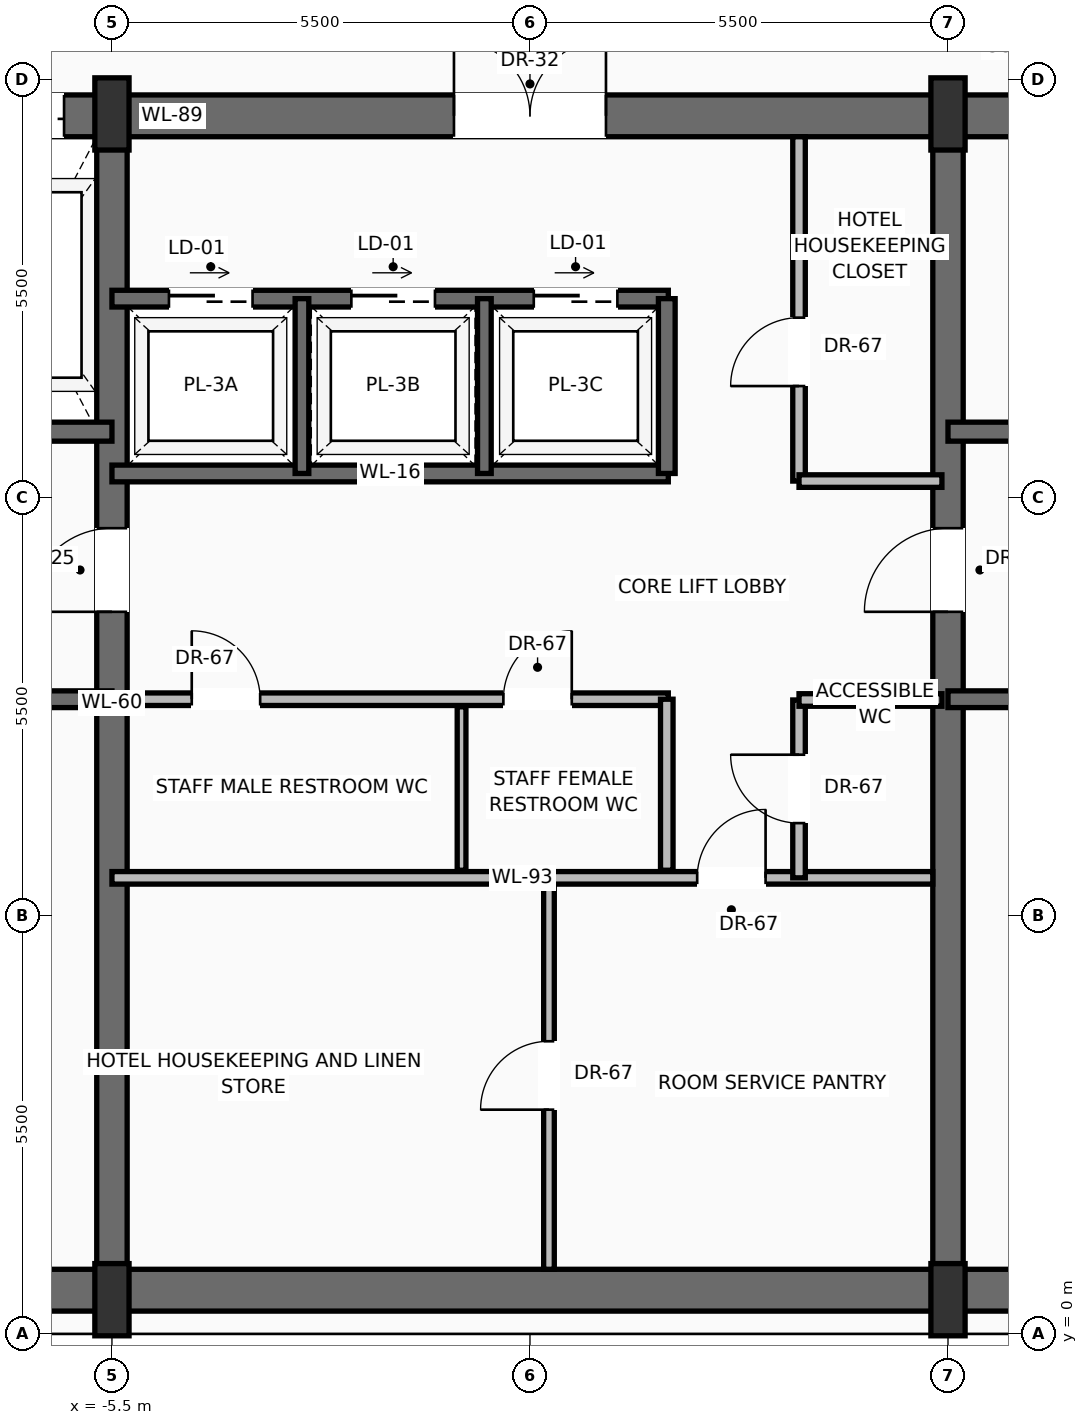
"""IFC4 building model, lengths in metres.
Left out: names, types, materials, properties, quantities, classifications, styles, units other than length and angle.
Written with IfcOpenShell. Run it as: python <this file> out.ifc"""

import sys

from ifc_helpers import new_model, si_unit, direction, frame, frame_2d, origin, origin_2d, place, context, subcontext, project, spatial, rectangle, extrude, source, transform, mapped, element, fill, save


model = new_model("IFC4")
c1 = context("Model", 3, precision=1e-05, world=origin(), true_north=direction((0.0, 1.0)))
c2 = subcontext(c1, "Body", "Model", "MODEL_VIEW")
j1 = project(units=[si_unit("LENGTHUNIT", "METRE"), si_unit("PLANEANGLEUNIT", "RADIAN")], contexts=[c1])
p1 = place(None, origin())
s1 = spatial("IfcSite", under=j1, at=p1, CompositionType="ELEMENT")
p2 = place(p1, origin())
s2 = spatial("IfcBuilding", under=s1, at=p2, CompositionType="ELEMENT")
p3 = place(p2, frame((0.0, 0.0, 230.35)))
s3 = spatial("IfcBuildingStorey", under=s2, at=p3, CompositionType="ELEMENT", Elevation=230.35)
p4 = place(p3, frame((-10.65, 0.575, 0.0), z_axis=(0.0, 0.0, 1.0), x_axis=(1.0, 0.0, 0.0)))
e1 = element("IfcWall", 1, at=p4, inside=s3, PredefinedType="SHEAR", context=c2, shape_type="SweptSolid", body=[
    extrude(rectangle(XDim=21.3, YDim=0.55, at=frame_2d((10.65, 0.0))), origin(), (0.0, 0.0, 1.0), 3.24),
])
p5 = place(p3, frame((-10.7, 16.025, 0.0), z_axis=(0.0, 0.0, 1.0), x_axis=(1.0, 0.0, 0.0)))
e2 = element("IfcWall", 2, at=p5, inside=s3, PredefinedType="SHEAR", context=c2, shape_type="SweptSolid", body=[
    extrude(rectangle(XDim=21.4, YDim=0.55, at=frame_2d((10.7, 0.0))), origin(), (0.0, 0.0, 1.0), 3.24),
])
p6 = place(p5, frame((3.27, 0.0, 0.0)))
e3 = element("IfcOpeningElement", 3, at=p6, cuts=e2, PredefinedType="OPENING", context=c2, shape_type="SweptSolid", body=[
    extrude(rectangle(XDim=1.3, YDim=2.3, at=frame_2d((0.65, 1.15))), frame((0.0, 0.285, 0.0), z_axis=(0.0, -1.0, 0.0), x_axis=(1.0, 0.0, 0.0)), (0.0, 0.0, 1.0), 0.57),
])
p7 = place(p5, frame((9.7, 0.0, 0.0)))
e4 = element("IfcOpeningElement", 4, at=p7, cuts=e2, PredefinedType="OPENING", context=c2, shape_type="SweptSolid", body=[
    extrude(rectangle(XDim=2.0, YDim=2.4, at=frame_2d((1.0, 1.2))), frame((0.0, 0.285, 0.0), z_axis=(0.0, -1.0, 0.0), x_axis=(1.0, 0.0, 0.0)), (0.0, 0.0, 1.0), 0.57),
])
p8 = place(p3, frame((-5.5, 0.575, 0.0), z_axis=(0.0, 0.0, 1.0), x_axis=(0.0, 1.0, 0.0)))
e5 = element("IfcWall", 5, at=p8, inside=s3, PredefinedType="SHEAR", context=c2, shape_type="SweptSolid", body=[
    extrude(rectangle(XDim=15.45, YDim=0.4, at=frame_2d((7.725, 0.0))), origin(), (0.0, 0.0, 1.0), 3.24),
])
p9 = place(p8, frame((8.925, 0.0, 0.0)))
e6 = element("IfcOpeningElement", 6, at=p9, cuts=e5, PredefinedType="OPENING", context=c2, shape_type="SweptSolid", body=[
    extrude(rectangle(XDim=1.1, YDim=2.2, at=frame_2d((0.55, 1.1))), frame((0.0, 0.21, 0.0), z_axis=(0.0, -1.0, 0.0), x_axis=(1.0, 0.0, 0.0)), (0.0, 0.0, 1.0), 0.42),
])
p10 = place(p3, frame((5.5, 0.575, 0.0), z_axis=(0.0, 0.0, 1.0), x_axis=(0.0, 1.0, 0.0)))
e7 = element("IfcWall", 7, at=p10, inside=s3, PredefinedType="SHEAR", context=c2, shape_type="SweptSolid", body=[
    extrude(rectangle(XDim=15.45, YDim=0.4, at=frame_2d((7.725, 0.0))), origin(), (0.0, 0.0, 1.0), 3.24),
])
p11 = place(p10, frame((8.925, 0.0, 0.0)))
e8 = element("IfcOpeningElement", 8, at=p11, cuts=e7, PredefinedType="OPENING", context=c2, shape_type="SweptSolid", body=[
    extrude(rectangle(XDim=1.1, YDim=2.2, at=frame_2d((0.55, 1.1))), frame((0.0, 0.21, 0.0), z_axis=(0.0, -1.0, 0.0), x_axis=(1.0, 0.0, 0.0)), (0.0, 0.0, 1.0), 0.42),
])
m1 = source(origin(), c2, "Body", "SweptSolid", [
    extrude(rectangle(XDim=0.45, YDim=0.95, at=origin_2d()), origin(), (0.0, 0.0, 1.0), 3.45),
])
for number, where, z_axis, x_axis in (
    (9, (-5.5, 0.45, 0.0), (0.0, 0.0, 1.0), (1.0, 0.0, 0.0)),
    (10, (5.5, 0.45, 0.0), (0.0, 0.0, 1.0), (1.0, 0.0, 0.0)),
    (11, (-5.5, 16.05, 0.0), (0.0, 0.0, 1.0), (1.0, 0.0, 0.0)),
    (12, (5.5, 16.05, 0.0), (0.0, 0.0, 1.0), (1.0, 0.0, 0.0)),
):
    element("IfcColumn", number, at=place(p3, frame(where, z_axis=z_axis, x_axis=x_axis)), inside=s3, PredefinedType="PILASTER", context=c2, shape_type="MappedRepresentation", body=[
        mapped(m1, transform((0.0, 0.0, 0.0), scale=1.0)),
    ])
p12 = place(p3, frame((-5.5, 8.35, 0.0), z_axis=(0.0, 0.0, 1.0), x_axis=(-1.0, 0.0, 0.0)))
e13 = element("IfcWall", 13, at=p12, inside=s3, PredefinedType="SOLIDWALL", context=c2, shape_type="SweptSolid", body=[
    extrude(rectangle(XDim=4.65, YDim=0.22, at=frame_2d((2.325, 0.0))), origin(), (0.0, 0.0, 1.0), 3.24),
])
p13 = place(p12, frame((2.5, 0.0, 0.0)))
e14 = element("IfcOpeningElement", 14, at=p13, cuts=e13, PredefinedType="OPENING", context=c2, shape_type="SweptSolid", body=[
    extrude(rectangle(XDim=1.15, YDim=2.2, at=frame_2d((0.575, 1.1))), frame((0.0, 0.12, 0.0), z_axis=(0.0, -1.0, 0.0), x_axis=(1.0, 0.0, 0.0)), (0.0, 0.0, 1.0), 0.24),
])
p14 = place(p3, frame((-5.5, 11.87, 0.0), z_axis=(0.0, 0.0, 1.0), x_axis=(-1.0, 0.0, 0.0)))
e15 = element("IfcWall", 15, at=p14, inside=s3, PredefinedType="SOLIDWALL", context=c2, shape_type="SweptSolid", body=[
    extrude(rectangle(XDim=4.65, YDim=0.25, at=frame_2d((2.325, 0.0))), origin(), (0.0, 0.0, 1.0), 3.24),
])
p15 = place(p14, frame((2.95, 0.0, 0.0)))
e16 = element("IfcOpeningElement", 16, at=p15, cuts=e15, PredefinedType="OPENING", context=c2, shape_type="SweptSolid", body=[
    extrude(rectangle(XDim=1.2, YDim=2.25, at=frame_2d((0.6, 1.125))), frame((0.0, 0.135, 0.0), z_axis=(0.0, -1.0, 0.0), x_axis=(1.0, 0.0, 0.0)), (0.0, 0.0, 1.0), 0.27),
])
p16 = place(p3, frame((10.15, 8.35, 0.0), z_axis=(0.0, 0.0, 1.0), x_axis=(-1.0, 0.0, 0.0)))
e17 = element("IfcWall", 17, at=p16, inside=s3, PredefinedType="SOLIDWALL", context=c2, shape_type="SweptSolid", body=[
    extrude(rectangle(XDim=4.65, YDim=0.22, at=frame_2d((2.325, 0.0))), origin(), (0.0, 0.0, 1.0), 3.24),
])
p17 = place(p16, frame((1.0, 0.0, 0.0)))
e18 = element("IfcOpeningElement", 18, at=p17, cuts=e17, PredefinedType="OPENING", context=c2, shape_type="SweptSolid", body=[
    extrude(rectangle(XDim=1.15, YDim=2.2, at=frame_2d((0.575, 1.1))), frame((0.0, 0.12, 0.0), z_axis=(0.0, -1.0, 0.0), x_axis=(1.0, 0.0, 0.0)), (0.0, 0.0, 1.0), 0.24),
])
p18 = place(p3, frame((10.15, 11.87, 0.0), z_axis=(0.0, 0.0, 1.0), x_axis=(-1.0, 0.0, 0.0)))
e19 = element("IfcWall", 19, at=p18, inside=s3, PredefinedType="SOLIDWALL", context=c2, shape_type="SweptSolid", body=[
    extrude(rectangle(XDim=4.65, YDim=0.25, at=frame_2d((2.325, 0.0))), origin(), (0.0, 0.0, 1.0), 3.24),
])
p19 = place(p18, frame((0.5, 0.0, 0.0)))
e20 = element("IfcOpeningElement", 20, at=p19, cuts=e19, PredefinedType="OPENING", context=c2, shape_type="SweptSolid", body=[
    extrude(rectangle(XDim=1.2, YDim=2.25, at=frame_2d((0.6, 1.125))), frame((0.0, 0.135, 0.0), z_axis=(0.0, -1.0, 0.0), x_axis=(1.0, 0.0, 0.0)), (0.0, 0.0, 1.0), 0.27),
])
p20 = place(p3, frame((-5.5, 6.0, 0.0), z_axis=(0.0, 0.0, 1.0), x_axis=(1.0, 0.0, 0.0)))
e21 = element("IfcWall", 21, at=p20, inside=s3, PredefinedType="PARTITIONING", context=c2, shape_type="SweptSolid", body=[
    extrude(rectangle(XDim=10.8, YDim=0.165, at=frame_2d((5.4, 0.0))), origin(), (0.0, 0.0, 1.0), 3.232),
])
p21 = place(p20, frame((7.7, 0.0, 0.0)))
e22 = element("IfcOpeningElement", 22, at=p21, cuts=e21, PredefinedType="OPENING", context=c2, shape_type="SweptSolid", body=[
    extrude(rectangle(XDim=0.9, YDim=2.1, at=frame_2d((0.45, 1.05))), frame((0.0, 0.093, 0.0), z_axis=(0.0, -1.0, 0.0), x_axis=(1.0, 0.0, 0.0)), (0.0, 0.0, 1.0), 0.185),
])
p22 = place(p3, frame((0.25, 0.85, 0.0), z_axis=(0.0, 0.0, 1.0), x_axis=(0.0, 1.0, 0.0)))
e23 = element("IfcWall", 23, at=p22, inside=s3, PredefinedType="PARTITIONING", context=c2, shape_type="SweptSolid", body=[
    extrude(rectangle(XDim=5.03, YDim=0.14, at=frame_2d((2.515, 0.0))), origin(), (0.0, 0.0, 1.0), 3.232),
])
p23 = place(p22, frame((2.1, 0.0, 0.0)))
e24 = element("IfcOpeningElement", 24, at=p23, cuts=e23, PredefinedType="OPENING", context=c2, shape_type="SweptSolid", body=[
    extrude(rectangle(XDim=0.9, YDim=2.1, at=frame_2d((0.45, 1.05))), frame((0.0, 0.08, 0.0), z_axis=(0.0, -1.0, 0.0), x_axis=(1.0, 0.0, 0.0)), (0.0, 0.0, 1.0), 0.16),
])
p24 = place(p3, frame((3.54, 6.0, 0.0), z_axis=(0.0, 0.0, 1.0), x_axis=(0.0, 1.0, 0.0)))
e25 = element("IfcWall", 25, at=p24, inside=s3, PredefinedType="PARTITIONING", context=c2, shape_type="SweptSolid", body=[
    extrude(rectangle(XDim=2.34, YDim=0.165, at=frame_2d((1.17, 0.0))), origin(), (0.0, 0.0, 1.0), 3.232),
])
p25 = place(p24, frame((0.72, 0.0, 0.0)))
e26 = element("IfcOpeningElement", 26, at=p25, cuts=e25, PredefinedType="OPENING", context=c2, shape_type="SweptSolid", body=[
    extrude(rectangle(XDim=0.9, YDim=2.1, at=frame_2d((0.45, 1.05))), frame((0.0, 0.093, 0.0), z_axis=(0.0, -1.0, 0.0), x_axis=(1.0, 0.0, 0.0)), (0.0, 0.0, 1.0), 0.185),
])
p26 = place(p3, frame((3.54, 8.34, 0.0), z_axis=(0.0, 0.0, 1.0), x_axis=(1.0, 0.0, 0.0)))
e27 = element("IfcWall", 27, at=p26, inside=s3, PredefinedType="PARTITIONING", context=c2, shape_type="SweptSolid", body=[
    extrude(rectangle(XDim=1.88, YDim=0.165, at=frame_2d((0.94, 0.0))), origin(), (0.0, 0.0, 1.0), 3.232),
])
p27 = place(p3, frame((-5.3, 8.35, 0.0), z_axis=(0.0, 0.0, 1.0), x_axis=(1.0, 0.0, 0.0)))
e28 = element("IfcWall", 28, at=p27, inside=s3, PredefinedType="PARTITIONING", context=c2, shape_type="SweptSolid", body=[
    extrude(rectangle(XDim=7.12, YDim=0.165, at=frame_2d((3.56, 0.0))), origin(), (0.0, 0.0, 1.0), 3.232),
])
p28 = place(p27, frame((0.85, 0.0, 0.0)))
e29 = element("IfcOpeningElement", 29, at=p28, cuts=e28, PredefinedType="OPENING", context=c2, shape_type="SweptSolid", body=[
    extrude(rectangle(XDim=0.9, YDim=2.1, at=frame_2d((0.45, 1.05))), frame((0.0, 0.093, 0.0), z_axis=(0.0, -1.0, 0.0), x_axis=(1.0, 0.0, 0.0)), (0.0, 0.0, 1.0), 0.185),
])
p29 = place(p27, frame((4.95, 0.0, 0.0)))
e30 = element("IfcOpeningElement", 30, at=p29, cuts=e28, PredefinedType="OPENING", context=c2, shape_type="SweptSolid", body=[
    extrude(rectangle(XDim=0.9, YDim=2.1, at=frame_2d((0.45, 1.05))), frame((0.0, 0.093, 0.0), z_axis=(0.0, -1.0, 0.0), x_axis=(1.0, 0.0, 0.0)), (0.0, 0.0, 1.0), 0.185),
])
p30 = place(p3, frame((1.8, 6.1, 0.0), z_axis=(0.0, 0.0, 1.0), x_axis=(0.0, 1.0, 0.0)))
e31 = element("IfcWall", 31, at=p30, inside=s3, PredefinedType="PARTITIONING", context=c2, shape_type="SweptSolid", body=[
    extrude(rectangle(XDim=2.25, YDim=0.165, at=frame_2d((1.125, 0.0))), origin(), (0.0, 0.0, 1.0), 3.232),
])
p31 = place(p3, frame((-0.9, 6.1, 0.0), z_axis=(0.0, 0.0, 1.0), x_axis=(0.0, 1.0, 0.0)))
e32 = element("IfcWall", 32, at=p31, inside=s3, PredefinedType="PARTITIONING", context=c2, shape_type="SweptSolid", body=[
    extrude(rectangle(XDim=2.15, YDim=0.115, at=frame_2d((1.075, 0.0))), origin(), (0.0, 0.0, 1.0), 3.232),
])
p32 = place(p3, frame((-5.5, 11.32, 0.0), z_axis=(0.0, 0.0, 1.0), x_axis=(1.0, 0.0, 0.0)))
e33 = element("IfcWall", 33, at=p32, inside=s3, PredefinedType="SOLIDWALL", context=c2, shape_type="SweptSolid", body=[
    extrude(rectangle(XDim=7.32, YDim=0.22, at=frame_2d((3.66, 0.0))), origin(), (0.0, 0.0, 1.0), 3.24),
])
p33 = place(p3, frame((-5.5, 13.62, 0.0), z_axis=(0.0, 0.0, 1.0), x_axis=(1.0, 0.0, 0.0)))
e34 = element("IfcWall", 34, at=p33, inside=s3, PredefinedType="SOLIDWALL", context=c2, shape_type="SweptSolid", body=[
    extrude(rectangle(XDim=7.32, YDim=0.22, at=frame_2d((3.66, 0.0))), origin(), (0.0, 0.0, 1.0), 3.24),
])
p34 = place(p33, frame((0.75, 0.0, 0.0)))
e35 = element("IfcOpeningElement", 35, at=p34, cuts=e34, PredefinedType="OPENING", context=c2, shape_type="SweptSolid", body=[
    extrude(rectangle(XDim=1.1, YDim=2.2, at=frame_2d((0.55, 1.1))), frame((0.0, 0.12, 0.0), z_axis=(0.0, -1.0, 0.0), x_axis=(1.0, 0.0, 0.0)), (0.0, 0.0, 1.0), 0.24),
])
p35 = place(p33, frame((3.15, 0.0, 0.0)))
e36 = element("IfcOpeningElement", 36, at=p35, cuts=e34, PredefinedType="OPENING", context=c2, shape_type="SweptSolid", body=[
    extrude(rectangle(XDim=1.1, YDim=2.2, at=frame_2d((0.55, 1.1))), frame((0.0, 0.12, 0.0), z_axis=(0.0, -1.0, 0.0), x_axis=(1.0, 0.0, 0.0)), (0.0, 0.0, 1.0), 0.24),
])
p36 = place(p33, frame((5.55, 0.0, 0.0)))
e37 = element("IfcOpeningElement", 37, at=p36, cuts=e34, PredefinedType="OPENING", context=c2, shape_type="SweptSolid", body=[
    extrude(rectangle(XDim=1.1, YDim=2.2, at=frame_2d((0.55, 1.1))), frame((0.0, 0.12, 0.0), z_axis=(0.0, -1.0, 0.0), x_axis=(1.0, 0.0, 0.0)), (0.0, 0.0, 1.0), 0.24),
])
p37 = place(p3, frame((1.8, 11.32, 0.0), z_axis=(0.0, 0.0, 1.0), x_axis=(0.0, 1.0, 0.0)))
e38 = element("IfcWall", 38, at=p37, inside=s3, PredefinedType="SOLIDWALL", context=c2, shape_type="SweptSolid", body=[
    extrude(rectangle(XDim=2.3, YDim=0.22, at=frame_2d((1.15, 0.0))), origin(), (0.0, 0.0, 1.0), 3.24),
])
for number, where, z_axis, x_axis in (
    (39, (-3.0, 11.32, 0.0), (0.0, 0.0, 1.0), (0.0, 1.0, 0.0)),
    (40, (-0.6, 11.32, 0.0), (0.0, 0.0, 1.0), (0.0, 1.0, 0.0)),
):
    element("IfcWall", number, at=place(p3, frame(where, z_axis=z_axis, x_axis=x_axis)), inside=s3, PredefinedType="SOLIDWALL", context=c2, shape_type="SweptSolid", body=[
        extrude(rectangle(XDim=2.3, YDim=0.18, at=frame_2d((1.15, 0.0))), origin(), (0.0, 0.0, 1.0), 3.24),
    ])
p38 = place(p3, frame((3.54, 11.22, 0.0), z_axis=(0.0, 0.0, 1.0), x_axis=(0.0, 1.0, 0.0)))
e41 = element("IfcWall", 41, at=p38, inside=s3, PredefinedType="PARTITIONING", context=c2, shape_type="SweptSolid", body=[
    extrude(rectangle(XDim=4.53, YDim=0.165, at=frame_2d((2.265, 0.0))), origin(), (0.0, 0.0, 1.0), 3.232),
])
p39 = place(p38, frame((1.25, 0.0, 0.0)))
e42 = element("IfcOpeningElement", 42, at=p39, cuts=e41, PredefinedType="OPENING", context=c2, shape_type="SweptSolid", body=[
    extrude(rectangle(XDim=0.9, YDim=2.1, at=frame_2d((0.45, 1.05))), frame((0.0, 0.093, 0.0), z_axis=(0.0, -1.0, 0.0), x_axis=(1.0, 0.0, 0.0)), (0.0, 0.0, 1.0), 0.185),
])
p40 = place(p3, frame((3.54, 11.22, 0.0), z_axis=(0.0, 0.0, 1.0), x_axis=(1.0, 0.0, 0.0)))
e43 = element("IfcWall", 43, at=p40, inside=s3, PredefinedType="PARTITIONING", context=c2, shape_type="SweptSolid", body=[
    extrude(rectangle(XDim=1.88, YDim=0.165, at=frame_2d((0.94, 0.0))), origin(), (0.0, 0.0, 1.0), 3.232),
])
m2 = source(origin(), c2, "Body", "SweptSolid", [
    extrude(rectangle(XDim=1.1, YDim=2.2, at=frame_2d((0.55, 1.1))), frame((0.0, 0.025, 0.0), z_axis=(0.0, -1.0, 0.0), x_axis=(1.0, 0.0, 0.0)), (0.0, 0.0, 1.0), 0.05),
])
p41 = place(p9, origin())
e44 = element("IfcDoor", 44, at=p41, inside=s3, OperationType="SINGLE_SWING_LEFT", PredefinedType="DOOR", context=c2, shape_type="MappedRepresentation", body=[
    mapped(m2, transform((0.0, 0.0, 0.0), scale=1.0)),
])
fill(e6, e44)
m3 = source(origin(), c2, "Body", "SweptSolid", [
    extrude(rectangle(XDim=1.3, YDim=2.3, at=frame_2d((0.65, 1.15))), frame((0.0, 0.025, 0.0), z_axis=(0.0, -1.0, 0.0), x_axis=(1.0, 0.0, 0.0)), (0.0, 0.0, 1.0), 0.05),
])
p42 = place(p6, origin())
e45 = element("IfcDoor", 45, at=p42, inside=s3, OperationType="SLIDING_TO_RIGHT", PredefinedType="DOOR", context=c2, shape_type="MappedRepresentation", body=[
    mapped(m3, transform((0.0, 0.0, 0.0), scale=1.0)),
])
fill(e3, e45)
p43 = place(p11, origin())
e46 = element("IfcDoor", 46, at=p43, inside=s3, OperationType="SINGLE_SWING_LEFT", PredefinedType="DOOR", context=c2, shape_type="MappedRepresentation", body=[
    mapped(m2, transform((0.0, 0.0, 0.0), scale=1.0)),
])
fill(e8, e46)
m4 = source(origin(), c2, "Body", "SweptSolid", [
    extrude(rectangle(XDim=2.0, YDim=2.4, at=frame_2d((1.0, 1.2))), frame((0.0, 0.025, 0.0), z_axis=(0.0, -1.0, 0.0), x_axis=(1.0, 0.0, 0.0)), (0.0, 0.0, 1.0), 0.05),
])
p44 = place(p7, origin())
e47 = element("IfcDoor", 47, at=p44, inside=s3, OperationType="DOUBLE_DOOR_SINGLE_SWING", PredefinedType="DOOR", context=c2, shape_type="MappedRepresentation", body=[
    mapped(m4, transform((0.0, 0.0, 0.0), scale=1.0)),
])
fill(e4, e47)
m5 = source(origin(), c2, "Body", "SweptSolid", [
    extrude(rectangle(XDim=0.9, YDim=2.1, at=frame_2d((0.45, 1.05))), frame((0.0, 0.025, 0.0), z_axis=(0.0, -1.0, 0.0), x_axis=(1.0, 0.0, 0.0)), (0.0, 0.0, 1.0), 0.05),
])
p45 = place(p21, origin())
e48 = element("IfcDoor", 48, at=p45, inside=s3, OperationType="SINGLE_SWING_RIGHT", PredefinedType="DOOR", context=c2, shape_type="MappedRepresentation", body=[
    mapped(m5, transform((0.0, 0.0, 0.0), scale=1.0)),
])
fill(e22, e48)
p46 = place(p23, origin())
e49 = element("IfcDoor", 49, at=p46, inside=s3, OperationType="SINGLE_SWING_LEFT", PredefinedType="DOOR", context=c2, shape_type="MappedRepresentation", body=[
    mapped(m5, transform((0.0, 0.0, 0.0), scale=1.0)),
])
fill(e24, e49)
p47 = place(p25, origin())
e50 = element("IfcDoor", 50, at=p47, inside=s3, OperationType="SINGLE_SWING_RIGHT", PredefinedType="DOOR", context=c2, shape_type="MappedRepresentation", body=[
    mapped(m5, transform((0.0, 0.0, 0.0), scale=1.0)),
])
fill(e26, e50)
p48 = place(p28, origin())
e51 = element("IfcDoor", 51, at=p48, inside=s3, OperationType="SINGLE_SWING_LEFT", PredefinedType="DOOR", context=c2, shape_type="MappedRepresentation", body=[
    mapped(m5, transform((0.0, 0.0, 0.0), scale=1.0)),
])
fill(e29, e51)
p49 = place(p29, origin())
e52 = element("IfcDoor", 52, at=p49, inside=s3, OperationType="SINGLE_SWING_RIGHT", PredefinedType="DOOR", context=c2, shape_type="MappedRepresentation", body=[
    mapped(m5, transform((0.0, 0.0, 0.0), scale=1.0)),
])
fill(e30, e52)
m6 = source(origin(), c2, "Body", "SweptSolid", [
    extrude(rectangle(XDim=1.1, YDim=2.2, at=frame_2d((0.55, 1.1))), frame((0.0, 0.025, 0.0), z_axis=(0.0, -1.0, 0.0), x_axis=(1.0, 0.0, 0.0)), (0.0, 0.0, 1.0), 0.05),
])
p50 = place(p34, origin())
e53 = element("IfcDoor", 53, at=p50, inside=s3, OperationType="SLIDING_TO_RIGHT", PredefinedType="DOOR", context=c2, shape_type="MappedRepresentation", body=[
    mapped(m6, transform((0.0, 0.0, 0.0), scale=1.0)),
])
fill(e35, e53)
p51 = place(p35, origin())
e54 = element("IfcDoor", 54, at=p51, inside=s3, OperationType="SLIDING_TO_RIGHT", PredefinedType="DOOR", context=c2, shape_type="MappedRepresentation", body=[
    mapped(m6, transform((0.0, 0.0, 0.0), scale=1.0)),
])
fill(e36, e54)
p52 = place(p36, origin())
e55 = element("IfcDoor", 55, at=p52, inside=s3, OperationType="SLIDING_TO_RIGHT", PredefinedType="DOOR", context=c2, shape_type="MappedRepresentation", body=[
    mapped(m6, transform((0.0, 0.0, 0.0), scale=1.0)),
])
fill(e37, e55)
p53 = place(p39, origin())
e56 = element("IfcDoor", 56, at=p53, inside=s3, OperationType="SINGLE_SWING_LEFT", PredefinedType="DOOR", context=c2, shape_type="MappedRepresentation", body=[
    mapped(m5, transform((0.0, 0.0, 0.0), scale=1.0)),
])
fill(e42, e56)
save(model, sys.argv[1])
